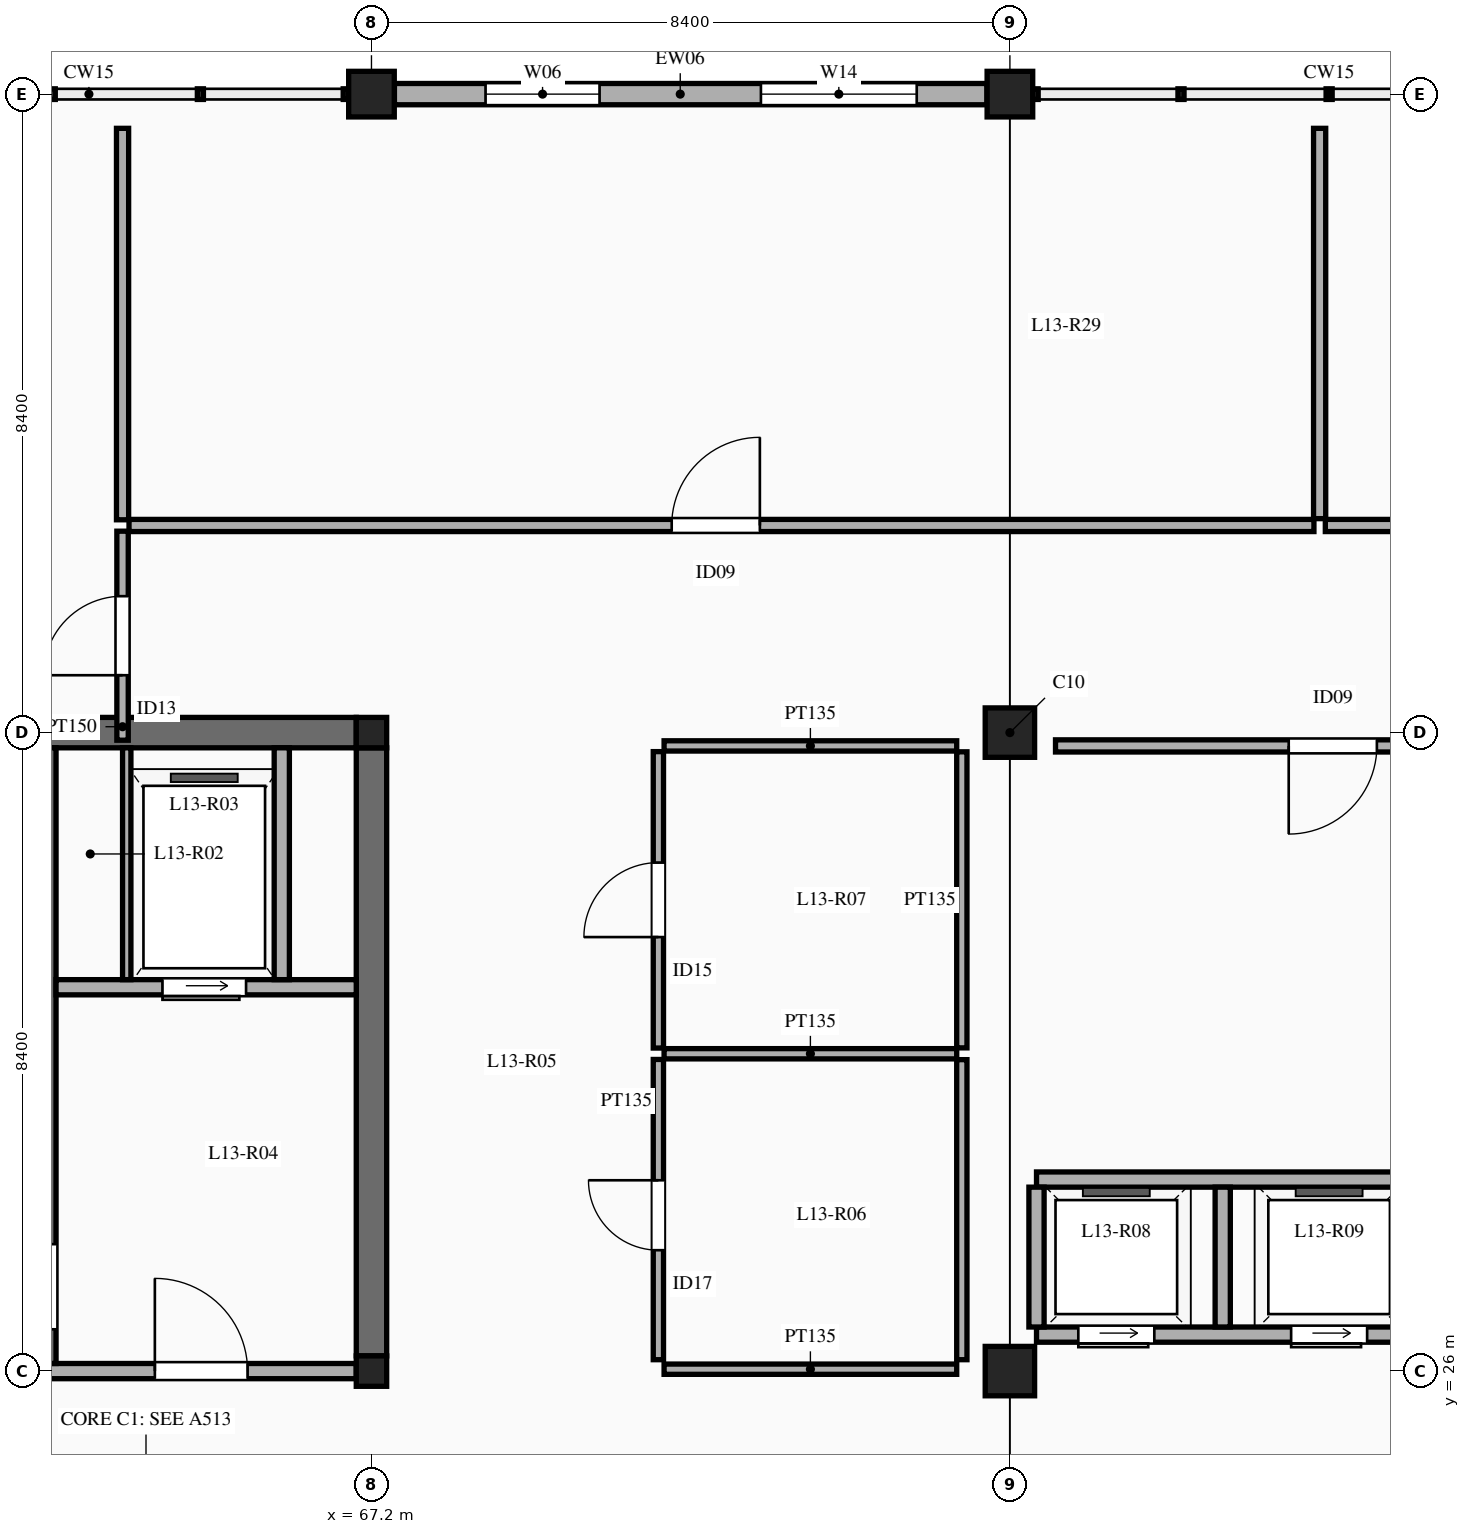
"""IFC4 building model, lengths in metres.
Left out: names, types, materials, properties, quantities, classifications, styles, units other than length and angle.
Written with IfcOpenShell. Run it as: python <this file> out.ifc"""

import sys

from ifc_helpers import new_model, si_unit, direction, frame, frame_2d, origin, origin_2d, place, context, subcontext, project, spatial, rectangle, extrude, element, fill, save


model = new_model("IFC4")
c1 = context("Model", 3, precision=1e-05, world=origin(), true_north=direction((0.0, 1.0)))
c2 = subcontext(c1, "Body", "Model", "MODEL_VIEW")
j1 = project(units=[si_unit("LENGTHUNIT", "METRE"), si_unit("PLANEANGLEUNIT", "RADIAN")], contexts=[c1])
p1 = place(None, origin())
s1 = spatial("IfcSite", under=j1, at=p1, CompositionType="ELEMENT")
p2 = place(p1, origin())
s2 = spatial("IfcBuilding", under=s1, at=p2, CompositionType="ELEMENT")
p3 = place(p2, frame((0.0, 0.0, 60.0)))
s3 = spatial("IfcBuildingStorey", under=s2, at=p3, CompositionType="ELEMENT", Elevation=60.0)
for number, where, z_axis, x_axis in (
    (1, (67.2, 26.0, 0.0), (0.0, 0.0, 1.0), (1.0, 0.0, 0.0)),
    (2, (67.2, 34.4, 0.0), (0.0, 0.0, 1.0), (1.0, 0.0, 0.0)),
):
    element("IfcColumn", number, at=place(p3, frame(where, z_axis=z_axis, x_axis=x_axis)), inside=s3, PredefinedType="COLUMN", context=c2, shape_type="SweptSolid", body=[
        extrude(rectangle(XDim=0.4, YDim=0.4, at=origin_2d()), origin(), (0.0, 0.0, 1.0), 4.5),
    ])
p4 = place(p3, frame((67.2, 42.8, 0.0), z_axis=(0.0, 0.0, 1.0), x_axis=(1.0, 0.0, 0.0)))
e3 = element("IfcColumn", 3, at=p4, inside=s3, PredefinedType="COLUMN", context=c2, shape_type="SweptSolid", body=[
    extrude(rectangle(XDim=0.6, YDim=0.6, at=origin_2d()), origin(), (0.0, 0.0, 1.0), 4.5),
])
for number, where, z_axis, x_axis in (
    (4, (75.6, 26.0, 0.0), (0.0, 0.0, 1.0), (1.0, 0.0, 0.0)),
    (5, (75.6, 34.4, 0.0), (0.0, 0.0, 1.0), (1.0, 0.0, 0.0)),
):
    element("IfcColumn", number, at=place(p3, frame(where, z_axis=z_axis, x_axis=x_axis)), inside=s3, PredefinedType="COLUMN", context=c2, shape_type="SweptSolid", body=[
        extrude(rectangle(XDim=0.65, YDim=0.65, at=origin_2d()), origin(), (0.0, 0.0, 1.0), 4.5),
    ])
p5 = place(p3, frame((75.6, 42.8, 0.0), z_axis=(0.0, 0.0, 1.0), x_axis=(1.0, 0.0, 0.0)))
e6 = element("IfcColumn", 6, at=p5, inside=s3, PredefinedType="COLUMN", context=c2, shape_type="SweptSolid", body=[
    extrude(rectangle(XDim=0.6, YDim=0.6, at=origin_2d()), origin(), (0.0, 0.0, 1.0), 4.5),
])
for number, where, z_axis, x_axis in (
    (7, (67.2, 26.2, 0.0), (0.0, 0.0, 1.0), (0.0, 1.0, 0.0)),
    (8, (59.0, 34.4, 0.0), (0.0, 0.0, 1.0), (1.0, 0.0, 0.0)),
):
    element("IfcWall", number, at=place(p3, frame(where, z_axis=z_axis, x_axis=x_axis)), inside=s3, PredefinedType="SHEAR", context=c2, shape_type="SweptSolid", body=[
        extrude(rectangle(XDim=8.0, YDim=0.4, at=frame_2d((4.0, 0.0))), origin(), (0.0, 0.0, 1.0), 4.5),
    ])
p6 = place(p3, frame((67.502, 42.8, 0.0), z_axis=(0.0, 0.0, 1.0), x_axis=(1.0, 0.0, 0.0)))
e9 = element("IfcWall", 9, at=p6, inside=s3, PredefinedType="ELEMENTEDWALL", context=c2, shape_type="SweptSolid", body=[
    extrude(rectangle(XDim=7.796, YDim=0.28, at=frame_2d((3.898, 0.0))), origin(), (0.0, 0.0, 1.0), 3.55),
])
p7 = place(p6, frame((1.199, 0.0, 0.9)))
e10 = element("IfcOpeningElement", 10, at=p7, cuts=e9, PredefinedType="OPENING", context=c2, shape_type="SweptSolid", body=[
    extrude(rectangle(XDim=1.5, YDim=2.0, at=frame_2d((0.75, 1.0))), frame((0.0, 0.15, 0.0), z_axis=(0.0, -1.0, 0.0), x_axis=(1.0, 0.0, 0.0)), (0.0, 0.0, 1.0), 0.3),
])
p8 = place(p6, frame((4.822, 0.0, 0.9)))
e11 = element("IfcOpeningElement", 11, at=p8, cuts=e9, PredefinedType="OPENING", context=c2, shape_type="SweptSolid", body=[
    extrude(rectangle(XDim=2.05, YDim=2.1, at=frame_2d((1.025, 1.05))), frame((0.0, 0.15, 0.0), z_axis=(0.0, -1.0, 0.0), x_axis=(1.0, 0.0, 0.0)), (0.0, 0.0, 1.0), 0.3),
])
p9 = place(p3, frame((59.0, 26.0, 0.0), z_axis=(0.0, 0.0, 1.0), x_axis=(1.0, 0.0, 0.0)))
e12 = element("IfcWall", 12, at=p9, inside=s3, PredefinedType="SOLIDWALL", context=c2, shape_type="SweptSolid", body=[
    extrude(rectangle(XDim=8.0, YDim=0.2, at=frame_2d((4.0, 0.0))), origin(), (0.0, 0.0, 1.0), 3.88),
])
p10 = place(p9, frame((1.55, 0.0, 0.0)))
e13 = element("IfcOpeningElement", 13, at=p10, cuts=e12, PredefinedType="OPENING", context=c2, shape_type="SweptSolid", body=[
    extrude(rectangle(XDim=1.15, YDim=2.15, at=frame_2d((0.575, 1.075))), frame((0.0, 0.11, 0.0), z_axis=(0.0, -1.0, 0.0), x_axis=(1.0, 0.0, 0.0)), (0.0, 0.0, 1.0), 0.22),
])
p11 = place(p9, frame((5.35, 0.0, 0.0)))
e14 = element("IfcOpeningElement", 14, at=p11, cuts=e12, PredefinedType="OPENING", context=c2, shape_type="SweptSolid", body=[
    extrude(rectangle(XDim=1.22, YDim=2.15, at=frame_2d((0.61, 1.075))), frame((0.0, 0.11, 0.0), z_axis=(0.0, -1.0, 0.0), x_axis=(1.0, 0.0, 0.0)), (0.0, 0.0, 1.0), 0.22),
])
p12 = place(p3, frame((62.95, 26.1, 0.0), z_axis=(0.0, 0.0, 1.0), x_axis=(0.0, 1.0, 0.0)))
e15 = element("IfcWall", 15, at=p12, inside=s3, PredefinedType="SOLIDWALL", context=c2, shape_type="SweptSolid", body=[
    extrude(rectangle(XDim=8.1, YDim=0.2, at=frame_2d((4.05, 0.0))), origin(), (0.0, 0.0, 1.0), 4.3),
])
p13 = place(p12, frame((0.45, 0.0, 0.0)))
e16 = element("IfcOpeningElement", 16, at=p13, cuts=e15, PredefinedType="OPENING", context=c2, shape_type="SweptSolid", body=[
    extrude(rectangle(XDim=1.12, YDim=2.15, at=frame_2d((0.56, 1.075))), frame((0.0, 0.11, 0.0), z_axis=(0.0, -1.0, 0.0), x_axis=(1.0, 0.0, 0.0)), (0.0, 0.0, 1.0), 0.22),
])
p14 = place(p3, frame((63.05, 31.05, 0.0), z_axis=(0.0, 0.0, 1.0), x_axis=(1.0, 0.0, 0.0)))
e17 = element("IfcWall", 17, at=p14, inside=s3, PredefinedType="SOLIDWALL", context=c2, shape_type="SweptSolid", body=[
    extrude(rectangle(XDim=3.95, YDim=0.2, at=frame_2d((1.975, 0.0))), origin(), (0.0, 0.0, 1.0), 4.3),
])
p15 = place(p14, frame((1.4, 0.0, 0.0)))
e18 = element("IfcOpeningElement", 18, at=p15, cuts=e17, PredefinedType="OPENING", context=c2, shape_type="SweptSolid", body=[
    extrude(rectangle(XDim=1.1, YDim=2.15, at=frame_2d((0.55, 1.075))), frame((0.0, 0.11, 0.0), z_axis=(0.0, -1.0, 0.0), x_axis=(1.0, 0.0, 0.0)), (0.0, 0.0, 1.0), 0.22),
])
p16 = place(p3, frame((63.98, 31.15, 0.0), z_axis=(0.0, 0.0, 1.0), x_axis=(0.0, 1.0, 0.0)))
e19 = element("IfcWall", 19, at=p16, inside=s3, PredefinedType="PARTITIONING", context=c2, shape_type="SweptSolid", body=[
    extrude(rectangle(XDim=3.05, YDim=0.11, at=frame_2d((1.525, 0.0))), origin(), (0.0, 0.0, 1.0), 4.3),
])
p17 = place(p3, frame((66.02, 31.15, 0.0), z_axis=(0.0, 0.0, 1.0), x_axis=(0.0, 1.0, 0.0)))
e20 = element("IfcWall", 20, at=p17, inside=s3, PredefinedType="SOLIDWALL", context=c2, shape_type="SweptSolid", body=[
    extrude(rectangle(XDim=3.05, YDim=0.2, at=frame_2d((1.525, 0.0))), origin(), (0.0, 0.0, 1.0), 4.3),
])
p18 = place(p3, frame((75.95, 26.48, 0.0), z_axis=(0.0, 0.0, 1.0), x_axis=(1.0, 0.0, 0.0)))
e21 = element("IfcWall", 21, at=p18, inside=s3, PredefinedType="SOLIDWALL", context=c2, shape_type="SweptSolid", body=[
    extrude(rectangle(XDim=7.77, YDim=0.2, at=frame_2d((3.885, 0.0))), origin(), (0.0, 0.0, 1.0), 4.3),
])
p19 = place(p18, frame((0.55, 0.0, 0.0)))
e22 = element("IfcOpeningElement", 22, at=p19, cuts=e21, PredefinedType="OPENING", context=c2, shape_type="SweptSolid", body=[
    extrude(rectangle(XDim=1.0, YDim=2.15, at=frame_2d((0.5, 1.075))), frame((0.0, 0.11, 0.0), z_axis=(0.0, -1.0, 0.0), x_axis=(1.0, 0.0, 0.0)), (0.0, 0.0, 1.0), 0.22),
])
p20 = place(p18, frame((3.35, 0.0, 0.0)))
e23 = element("IfcOpeningElement", 23, at=p20, cuts=e21, PredefinedType="OPENING", context=c2, shape_type="SweptSolid", body=[
    extrude(rectangle(XDim=1.0, YDim=2.15, at=frame_2d((0.5, 1.075))), frame((0.0, 0.11, 0.0), z_axis=(0.0, -1.0, 0.0), x_axis=(1.0, 0.0, 0.0)), (0.0, 0.0, 1.0), 0.22),
])
p21 = place(p18, frame((6.15, 0.0, 0.0)))
e24 = element("IfcOpeningElement", 24, at=p21, cuts=e21, PredefinedType="OPENING", context=c2, shape_type="SweptSolid", body=[
    extrude(rectangle(XDim=1.0, YDim=2.15, at=frame_2d((0.5, 1.075))), frame((0.0, 0.11, 0.0), z_axis=(0.0, -1.0, 0.0), x_axis=(1.0, 0.0, 0.0)), (0.0, 0.0, 1.0), 0.22),
])
p22 = place(p3, frame((75.95, 28.52, 0.0), z_axis=(0.0, 0.0, 1.0), x_axis=(1.0, 0.0, 0.0)))
e25 = element("IfcWall", 25, at=p22, inside=s3, PredefinedType="SOLIDWALL", context=c2, shape_type="SweptSolid", body=[
    extrude(rectangle(XDim=7.77, YDim=0.2, at=frame_2d((3.885, 0.0))), origin(), (0.0, 0.0, 1.0), 4.3),
])
for number, where, z_axis, x_axis in (
    (26, (75.95, 26.58, 0.0), (0.0, 0.0, 1.0), (0.0, 1.0, 0.0)),
    (27, (78.4, 26.58, 0.0), (0.0, 0.0, 1.0), (0.0, 1.0, 0.0)),
):
    element("IfcWall", number, at=place(p3, frame(where, z_axis=z_axis, x_axis=x_axis)), inside=s3, PredefinedType="SOLIDWALL", context=c2, shape_type="SweptSolid", body=[
        extrude(rectangle(XDim=1.84, YDim=0.2, at=frame_2d((0.92, 0.0))), origin(), (0.0, 0.0, 1.0), 4.3),
    ])
p23 = place(p3, frame((70.975, 26.15, 0.0), z_axis=(0.0, 0.0, 1.0), x_axis=(0.0, 1.0, 0.0)))
e28 = element("IfcWall", 28, at=p23, inside=s3, PredefinedType="PARTITIONING", context=c2, shape_type="SweptSolid", body=[
    extrude(rectangle(XDim=3.95, YDim=0.135, at=frame_2d((1.975, 0.0))), origin(), (0.0, 0.0, 1.0), 3.45),
])
p24 = place(p23, frame((1.441, 0.0, 0.0)))
e29 = element("IfcOpeningElement", 29, at=p24, cuts=e28, PredefinedType="OPENING", context=c2, shape_type="SweptSolid", body=[
    extrude(rectangle(XDim=0.92, YDim=2.12, at=frame_2d((0.46, 1.06))), frame((0.0, 0.077, 0.0), z_axis=(0.0, -1.0, 0.0), x_axis=(1.0, 0.0, 0.0)), (0.0, 0.0, 1.0), 0.155),
])
p25 = place(p3, frame((70.975, 30.25, 0.0), z_axis=(0.0, 0.0, 1.0), x_axis=(0.0, 1.0, 0.0)))
e30 = element("IfcWall", 30, at=p25, inside=s3, PredefinedType="PARTITIONING", context=c2, shape_type="SweptSolid", body=[
    extrude(rectangle(XDim=3.9, YDim=0.135, at=frame_2d((1.95, 0.0))), origin(), (0.0, 0.0, 1.0), 3.45),
])
p26 = place(p25, frame((1.46, 0.0, 0.0)))
e31 = element("IfcOpeningElement", 31, at=p26, cuts=e30, PredefinedType="OPENING", context=c2, shape_type="SweptSolid", body=[
    extrude(rectangle(XDim=0.98, YDim=2.15, at=frame_2d((0.49, 1.075))), frame((0.0, 0.077, 0.0), z_axis=(0.0, -1.0, 0.0), x_axis=(1.0, 0.0, 0.0)), (0.0, 0.0, 1.0), 0.155),
])
for number, where, z_axis, x_axis in (
    (32, (71.05, 30.175, 0.0), (0.0, 0.0, 1.0), (1.0, 0.0, 0.0)),
    (33, (71.05, 26.025, 0.0), (0.0, 0.0, 1.0), (1.0, 0.0, 0.0)),
    (34, (71.05, 34.225, 0.0), (0.0, 0.0, 1.0), (1.0, 0.0, 0.0)),
):
    element("IfcWall", number, at=place(p3, frame(where, z_axis=z_axis, x_axis=x_axis)), inside=s3, PredefinedType="PARTITIONING", context=c2, shape_type="SweptSolid", body=[
        extrude(rectangle(XDim=3.85, YDim=0.135, at=frame_2d((1.925, 0.0))), origin(), (0.0, 0.0, 1.0), 3.45),
    ])
p27 = place(p3, frame((76.2, 34.225, 0.0), z_axis=(0.0, 0.0, 1.0), x_axis=(1.0, 0.0, 0.0)))
e35 = element("IfcWall", 35, at=p27, inside=s3, PredefinedType="PARTITIONING", context=c2, shape_type="SweptSolid", body=[
    extrude(rectangle(XDim=7.445, YDim=0.16, at=frame_2d((3.723, 0.0))), origin(), (0.0, 0.0, 1.0), 3.45),
])
p28 = place(p27, frame((3.068, 0.0, 0.0)))
e36 = element("IfcOpeningElement", 36, at=p28, cuts=e35, PredefinedType="OPENING", context=c2, shape_type="SweptSolid", body=[
    extrude(rectangle(XDim=1.16, YDim=2.2, at=frame_2d((0.58, 1.1))), frame((0.0, 0.09, 0.0), z_axis=(0.0, -1.0, 0.0), x_axis=(1.0, 0.0, 0.0)), (0.0, 0.0, 1.0), 0.18),
])
p29 = place(p3, frame((63.925, 34.3, 0.0), z_axis=(0.0, 0.0, 1.0), x_axis=(0.0, 1.0, 0.0)))
e37 = element("IfcWall", 37, at=p29, inside=s3, PredefinedType="PARTITIONING", context=c2, shape_type="SweptSolid", body=[
    extrude(rectangle(XDim=2.75, YDim=0.15, at=frame_2d((1.375, 0.0))), origin(), (0.0, 0.0, 1.0), 3.45),
])
p30 = place(p29, frame((0.855, 0.0, 0.0)))
e38 = element("IfcOpeningElement", 38, at=p30, cuts=e37, PredefinedType="OPENING", context=c2, shape_type="SweptSolid", body=[
    extrude(rectangle(XDim=1.04, YDim=2.15, at=frame_2d((0.52, 1.075))), frame((0.0, 0.085, 0.0), z_axis=(0.0, -1.0, 0.0), x_axis=(1.0, 0.0, 0.0)), (0.0, 0.0, 1.0), 0.17),
])
p31 = place(p3, frame((64.01, 37.125, 0.0), z_axis=(0.0, 0.0, 1.0), x_axis=(1.0, 0.0, 0.0)))
e39 = element("IfcWall", 39, at=p31, inside=s3, PredefinedType="PARTITIONING", context=c2, shape_type="SweptSolid", body=[
    extrude(rectangle(XDim=15.59, YDim=0.16, at=frame_2d((7.795, 0.0))), origin(), (0.0, 0.0, 1.0), 3.45),
])
p32 = place(p31, frame((7.14, 0.0, 0.0)))
e40 = element("IfcOpeningElement", 40, at=p32, cuts=e39, PredefinedType="OPENING", context=c2, shape_type="SweptSolid", body=[
    extrude(rectangle(XDim=1.16, YDim=2.2, at=frame_2d((0.58, 1.1))), frame((0.0, 0.09, 0.0), z_axis=(0.0, -1.0, 0.0), x_axis=(1.0, 0.0, 0.0)), (0.0, 0.0, 1.0), 0.18),
])
p33 = place(p3, frame((79.75, 37.125, 0.0), z_axis=(0.0, 0.0, 1.0), x_axis=(1.0, 0.0, 0.0)))
e41 = element("IfcWall", 41, at=p33, inside=s3, PredefinedType="PARTITIONING", context=c2, shape_type="SweptSolid", body=[
    extrude(rectangle(XDim=15.25, YDim=0.16, at=frame_2d((7.625, 0.0))), origin(), (0.0, 0.0, 1.0), 3.45),
])
p34 = place(p33, frame((6.97, 0.0, 0.0)))
e42 = element("IfcOpeningElement", 42, at=p34, cuts=e41, PredefinedType="OPENING", context=c2, shape_type="SweptSolid", body=[
    extrude(rectangle(XDim=1.16, YDim=2.2, at=frame_2d((0.58, 1.1))), frame((0.0, 0.09, 0.0), z_axis=(0.0, -1.0, 0.0), x_axis=(1.0, 0.0, 0.0)), (0.0, 0.0, 1.0), 0.18),
])
p35 = place(p3, frame((63.925, 37.2, 0.0), z_axis=(0.0, 0.0, 1.0), x_axis=(0.0, 1.0, 0.0)))
e43 = element("IfcWall", 43, at=p35, inside=s3, PredefinedType="PARTITIONING", context=c2, shape_type="SweptSolid", body=[
    extrude(rectangle(XDim=5.15, YDim=0.16, at=frame_2d((2.575, 0.0))), origin(), (0.0, 0.0, 1.0), 3.45),
])
p36 = place(p3, frame((79.675, 37.215, 0.0), z_axis=(0.0, 0.0, 1.0), x_axis=(0.0, 1.0, 0.0)))
e44 = element("IfcWall", 44, at=p36, inside=s3, PredefinedType="PARTITIONING", context=c2, shape_type="SweptSolid", body=[
    extrude(rectangle(XDim=5.135, YDim=0.16, at=frame_2d((2.567, 0.0))), origin(), (0.0, 0.0, 1.0), 3.45),
])
p37 = place(p3, frame((74.968, 26.15, 0.0), z_axis=(0.0, 0.0, 1.0), x_axis=(0.0, 1.0, 0.0)))
e45 = element("IfcWall", 45, at=p37, inside=s3, PredefinedType="PARTITIONING", context=c2, shape_type="SweptSolid", body=[
    extrude(rectangle(XDim=3.948, YDim=0.135, at=frame_2d((1.974, 0.0))), origin(), (0.0, 0.0, 1.0), 3.45),
])
p38 = place(p3, frame((74.968, 30.252, 0.0), z_axis=(0.0, 0.0, 1.0), x_axis=(0.0, 1.0, 0.0)))
e46 = element("IfcWall", 46, at=p38, inside=s3, PredefinedType="PARTITIONING", context=c2, shape_type="SweptSolid", body=[
    extrude(rectangle(XDim=3.895, YDim=0.135, at=frame_2d((1.948, 0.0))), origin(), (0.0, 0.0, 1.0), 3.45),
])
p39 = place(p7, origin())
e47 = element("IfcWindow", 47, at=p39, inside=s3, PartitioningType="DOUBLE_PANEL_VERTICAL", PredefinedType="WINDOW", context=c2, shape_type="SweptSolid", body=[
    extrude(rectangle(XDim=1.5, YDim=2.0, at=frame_2d((0.75, 1.0))), frame((0.0, 0.03, 0.0), z_axis=(0.0, -1.0, 0.0), x_axis=(1.0, 0.0, 0.0)), (0.0, 0.0, 1.0), 0.06),
])
fill(e10, e47)
p40 = place(p8, origin())
e48 = element("IfcWindow", 48, at=p40, inside=s3, PartitioningType="TRIPLE_PANEL_VERTICAL", PredefinedType="WINDOW", context=c2, shape_type="SweptSolid", body=[
    extrude(rectangle(XDim=2.05, YDim=2.1, at=frame_2d((1.025, 1.05))), frame((0.0, 0.03, 0.0), z_axis=(0.0, -1.0, 0.0), x_axis=(1.0, 0.0, 0.0)), (0.0, 0.0, 1.0), 0.06),
])
fill(e11, e48)
p41 = place(p11, origin())
e49 = element("IfcDoor", 49, at=p41, inside=s3, OperationType="SINGLE_SWING_LEFT", PredefinedType="DOOR", context=c2, shape_type="SweptSolid", body=[
    extrude(rectangle(XDim=1.22, YDim=2.15, at=frame_2d((0.61, 1.075))), frame((0.0, 0.025, 0.0), z_axis=(0.0, -1.0, 0.0), x_axis=(1.0, 0.0, 0.0)), (0.0, 0.0, 1.0), 0.05),
])
fill(e14, e49)
p42 = place(p15, frame((1.1, 0.0, 0.0), z_axis=(0.0, 0.0, 1.0), x_axis=(-1.0, 0.0, 0.0)))
e50 = element("IfcDoor", 50, at=p42, inside=s3, OperationType="SLIDING_TO_LEFT", PredefinedType="DOOR", context=c2, shape_type="SweptSolid", body=[
    extrude(rectangle(XDim=1.1, YDim=2.15, at=frame_2d((0.55, 1.075))), frame((0.0, 0.025, 0.0), z_axis=(0.0, -1.0, 0.0), x_axis=(1.0, 0.0, 0.0)), (0.0, 0.0, 1.0), 0.05),
])
fill(e18, e50)
p43 = place(p19, frame((1.0, 0.0, 0.0), z_axis=(0.0, 0.0, 1.0), x_axis=(-1.0, 0.0, 0.0)))
e51 = element("IfcDoor", 51, at=p43, inside=s3, OperationType="SLIDING_TO_LEFT", PredefinedType="DOOR", context=c2, shape_type="SweptSolid", body=[
    extrude(rectangle(XDim=1.0, YDim=2.15, at=frame_2d((0.5, 1.075))), frame((0.0, 0.025, 0.0), z_axis=(0.0, -1.0, 0.0), x_axis=(1.0, 0.0, 0.0)), (0.0, 0.0, 1.0), 0.05),
])
fill(e22, e51)
p44 = place(p20, frame((1.0, 0.0, 0.0), z_axis=(0.0, 0.0, 1.0), x_axis=(-1.0, 0.0, 0.0)))
e52 = element("IfcDoor", 52, at=p44, inside=s3, OperationType="SLIDING_TO_LEFT", PredefinedType="DOOR", context=c2, shape_type="SweptSolid", body=[
    extrude(rectangle(XDim=1.0, YDim=2.15, at=frame_2d((0.5, 1.075))), frame((0.0, 0.025, 0.0), z_axis=(0.0, -1.0, 0.0), x_axis=(1.0, 0.0, 0.0)), (0.0, 0.0, 1.0), 0.05),
])
fill(e23, e52)
p45 = place(p24, origin())
e53 = element("IfcDoor", 53, at=p45, inside=s3, OperationType="SINGLE_SWING_RIGHT", PredefinedType="DOOR", context=c2, shape_type="SweptSolid", body=[
    extrude(rectangle(XDim=0.92, YDim=2.12, at=frame_2d((0.46, 1.06))), frame((0.0, 0.025, 0.0), z_axis=(0.0, -1.0, 0.0), x_axis=(1.0, 0.0, 0.0)), (0.0, 0.0, 1.0), 0.05),
])
fill(e29, e53)
p46 = place(p26, origin())
e54 = element("IfcDoor", 54, at=p46, inside=s3, OperationType="SINGLE_SWING_LEFT", PredefinedType="DOOR", context=c2, shape_type="SweptSolid", body=[
    extrude(rectangle(XDim=0.98, YDim=2.15, at=frame_2d((0.49, 1.075))), frame((0.0, 0.025, 0.0), z_axis=(0.0, -1.0, 0.0), x_axis=(1.0, 0.0, 0.0)), (0.0, 0.0, 1.0), 0.05),
])
fill(e31, e54)
p47 = place(p28, frame((1.16, 0.0, 0.0), z_axis=(0.0, 0.0, 1.0), x_axis=(-1.0, 0.0, 0.0)))
e55 = element("IfcDoor", 55, at=p47, inside=s3, OperationType="SINGLE_SWING_RIGHT", PredefinedType="DOOR", context=c2, shape_type="SweptSolid", body=[
    extrude(rectangle(XDim=1.16, YDim=2.2, at=frame_2d((0.58, 1.1))), frame((0.0, 0.025, 0.0), z_axis=(0.0, -1.0, 0.0), x_axis=(1.0, 0.0, 0.0)), (0.0, 0.0, 1.0), 0.05),
])
fill(e36, e55)
p48 = place(p30, origin())
e56 = element("IfcDoor", 56, at=p48, inside=s3, OperationType="SINGLE_SWING_LEFT", PredefinedType="DOOR", context=c2, shape_type="SweptSolid", body=[
    extrude(rectangle(XDim=1.04, YDim=2.15, at=frame_2d((0.52, 1.075))), frame((0.0, 0.025, 0.0), z_axis=(0.0, -1.0, 0.0), x_axis=(1.0, 0.0, 0.0)), (0.0, 0.0, 1.0), 0.05),
])
fill(e38, e56)
p49 = place(p32, origin())
e57 = element("IfcDoor", 57, at=p49, inside=s3, OperationType="SINGLE_SWING_RIGHT", PredefinedType="DOOR", context=c2, shape_type="SweptSolid", body=[
    extrude(rectangle(XDim=1.16, YDim=2.2, at=frame_2d((0.58, 1.1))), frame((0.0, 0.025, 0.0), z_axis=(0.0, -1.0, 0.0), x_axis=(1.0, 0.0, 0.0)), (0.0, 0.0, 1.0), 0.05),
])
fill(e40, e57)
save(model, sys.argv[1])
